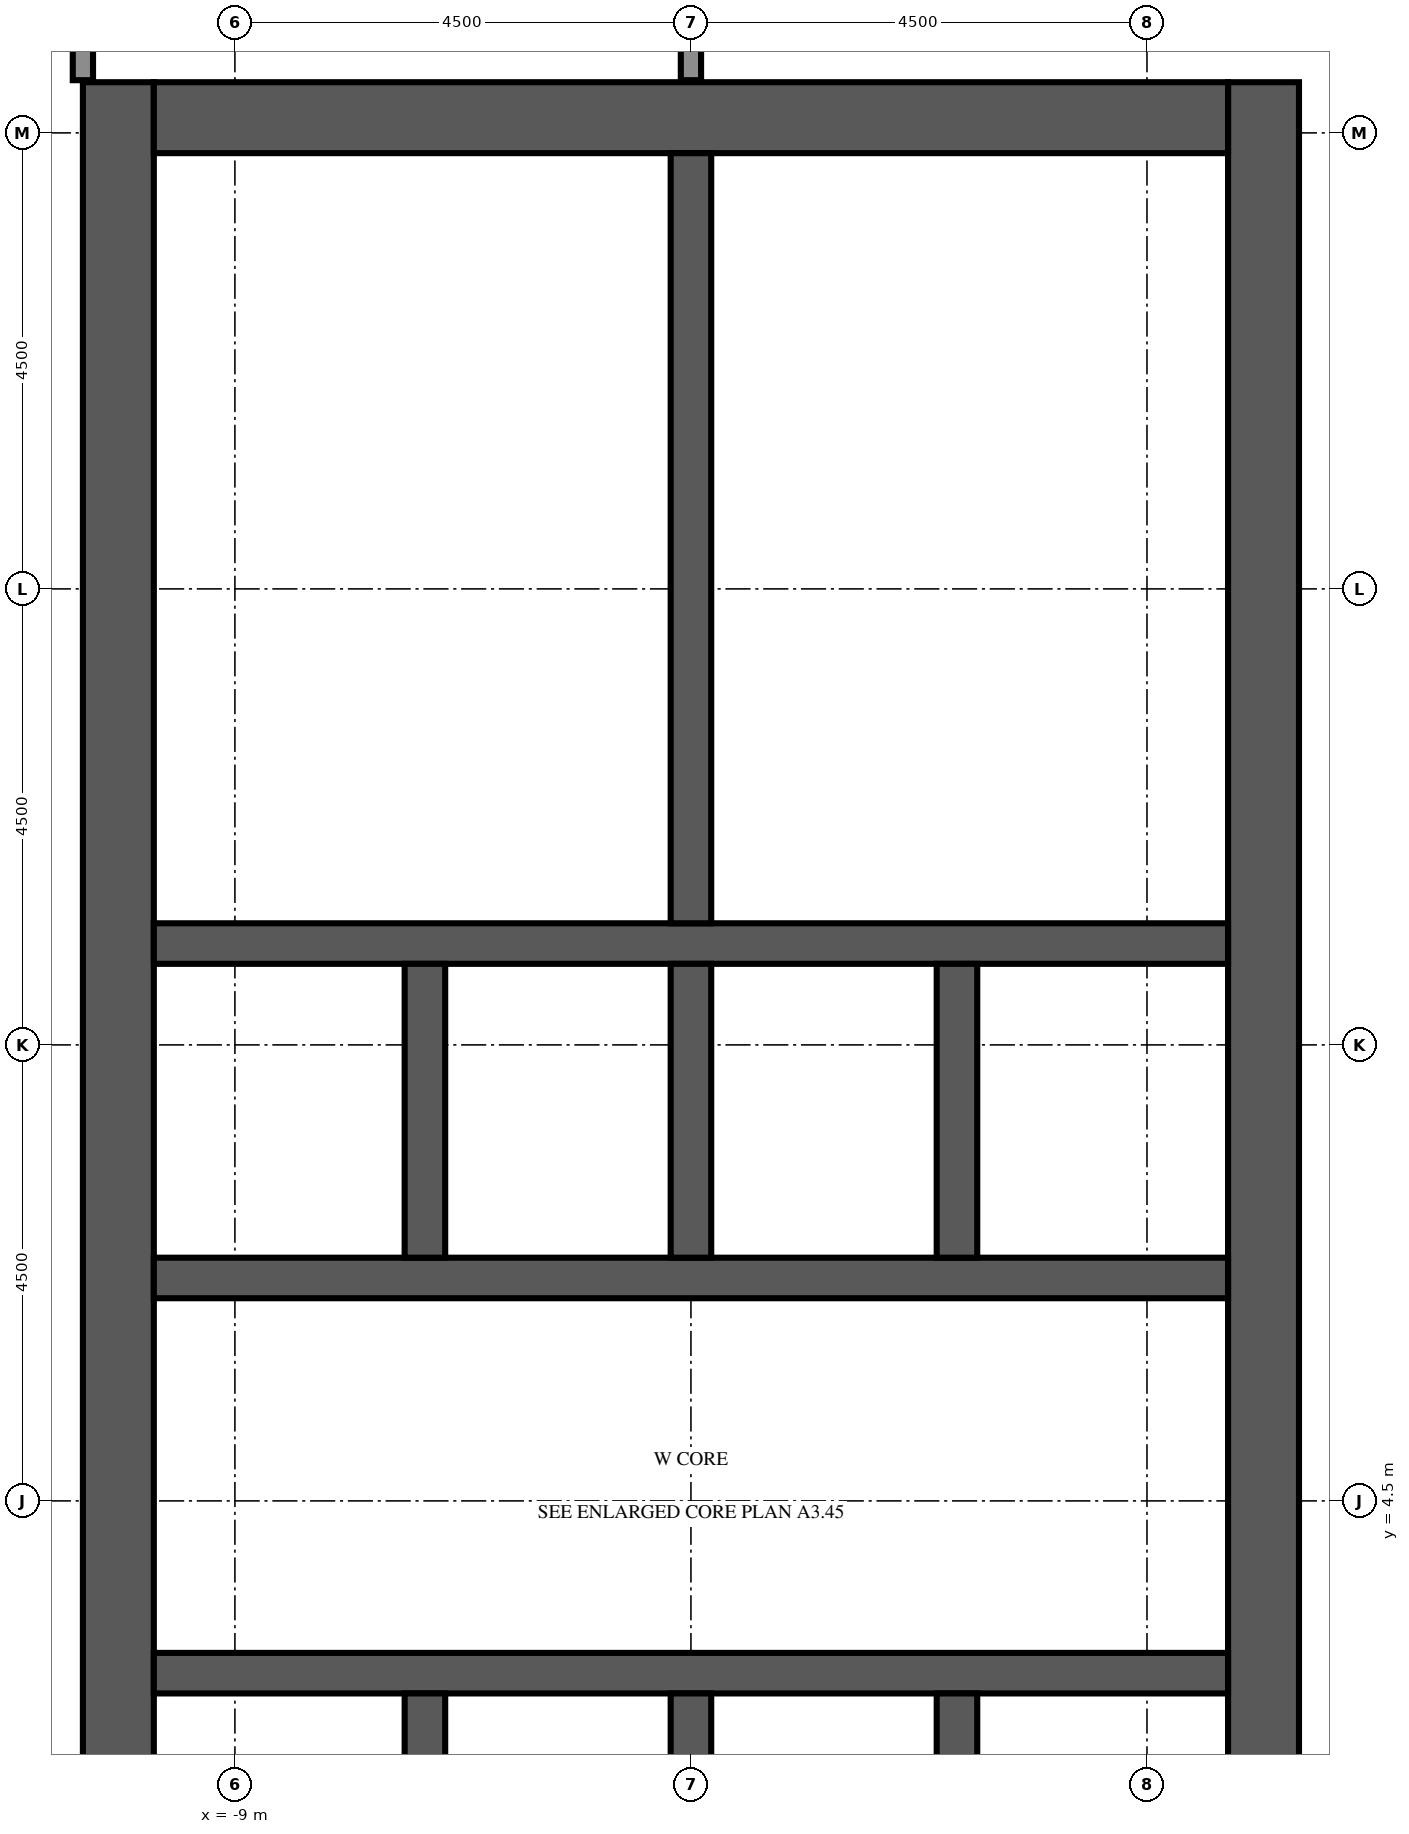
"""IFC4 building model, lengths in metres.
Left out: names, types, materials, properties, quantities, classifications, styles, units other than length and angle.
Written with IfcOpenShell. Run it as: python <this file> out.ifc"""

import sys

from ifc_helpers import new_model, si_unit, direction, frame, frame_2d, origin, place, context, subcontext, project, spatial, rectangle, extrude, element, fill, save


model = new_model("IFC4")
c1 = context("Model", 3, precision=1e-05, world=origin(), true_north=direction((0.0, 1.0)))
c2 = subcontext(c1, "Body", "Model", "MODEL_VIEW")
j1 = project(units=[si_unit("LENGTHUNIT", "METRE"), si_unit("PLANEANGLEUNIT", "RADIAN")], contexts=[c1])
p1 = place(None, origin())
s1 = spatial("IfcSite", under=j1, at=p1, CompositionType="ELEMENT")
p2 = place(p1, origin())
s2 = spatial("IfcBuilding", under=s1, at=p2, CompositionType="ELEMENT")
p3 = place(p2, frame((0.0, 0.0, 316.6)))
s3 = spatial("IfcBuildingStorey", under=s2, at=p3, CompositionType="ELEMENT", Elevation=316.6)
p4 = place(p3, frame((-10.15, -9.0, 0.0), z_axis=(0.0, 0.0, 1.0), x_axis=(0.0, 1.0, 0.0)))
e1 = element("IfcWall", 1, at=p4, inside=s3, PredefinedType="SHEAR", context=c2, shape_type="SweptSolid", body=[
    extrude(rectangle(XDim=27.5, YDim=0.7, at=frame_2d((13.75, 0.0))), origin(), (0.0, 0.0, 1.0), 4.8),
])
p5 = place(p4, frame((12.55, 0.0, 0.0)))
e2 = element("IfcOpeningElement", 2, at=p5, cuts=e1, PredefinedType="OPENING", context=c2, shape_type="SweptSolid", body=[
    extrude(rectangle(XDim=2.4, YDim=2.4, at=frame_2d((1.2, 1.2))), frame((0.0, 0.36, 0.0), z_axis=(0.0, -1.0, 0.0), x_axis=(1.0, 0.0, 0.0)), (0.0, 0.0, 1.0), 0.72),
])
p6 = place(p4, frame((6.825, 0.0, 0.0)))
e3 = element("IfcOpeningElement", 3, at=p6, cuts=e1, PredefinedType="OPENING", context=c2, shape_type="SweptSolid", body=[
    extrude(rectangle(XDim=1.2, YDim=2.1, at=frame_2d((0.6, 1.05))), frame((0.0, 0.36, 0.0), z_axis=(0.0, -1.0, 0.0), x_axis=(1.0, 0.0, 0.0)), (0.0, 0.0, 1.0), 0.72),
])
p7 = place(p4, frame((19.475, 0.0, 0.0)))
e4 = element("IfcOpeningElement", 4, at=p7, cuts=e1, PredefinedType="OPENING", context=c2, shape_type="SweptSolid", body=[
    extrude(rectangle(XDim=1.2, YDim=2.1, at=frame_2d((0.6, 1.05))), frame((0.0, 0.36, 0.0), z_axis=(0.0, -1.0, 0.0), x_axis=(1.0, 0.0, 0.0)), (0.0, 0.0, 1.0), 0.72),
])
p8 = place(p3, frame((1.15, -9.0, 0.0), z_axis=(0.0, 0.0, 1.0), x_axis=(0.0, 1.0, 0.0)))
e5 = element("IfcWall", 5, at=p8, inside=s3, PredefinedType="SHEAR", context=c2, shape_type="SweptSolid", body=[
    extrude(rectangle(XDim=27.5, YDim=0.7, at=frame_2d((13.75, 0.0))), origin(), (0.0, 0.0, 1.0), 4.8),
])
p9 = place(p8, frame((12.55, 0.0, 0.0)))
e6 = element("IfcOpeningElement", 6, at=p9, cuts=e5, PredefinedType="OPENING", context=c2, shape_type="SweptSolid", body=[
    extrude(rectangle(XDim=2.4, YDim=2.4, at=frame_2d((1.2, 1.2))), frame((0.0, 0.36, 0.0), z_axis=(0.0, -1.0, 0.0), x_axis=(1.0, 0.0, 0.0)), (0.0, 0.0, 1.0), 0.72),
])
p10 = place(p8, frame((5.42, 0.0, 0.0)))
e7 = element("IfcOpeningElement", 7, at=p10, cuts=e5, PredefinedType="OPENING", context=c2, shape_type="SweptSolid", body=[
    extrude(rectangle(XDim=1.2, YDim=2.1, at=frame_2d((0.6, 1.05))), frame((0.0, 0.36, 0.0), z_axis=(0.0, -1.0, 0.0), x_axis=(1.0, 0.0, 0.0)), (0.0, 0.0, 1.0), 0.72),
])
p11 = place(p8, frame((19.46, 0.0, 0.0)))
e8 = element("IfcOpeningElement", 8, at=p11, cuts=e5, PredefinedType="OPENING", context=c2, shape_type="SweptSolid", body=[
    extrude(rectangle(XDim=1.0, YDim=2.1, at=frame_2d((0.5, 1.05))), frame((0.0, 0.36, 0.0), z_axis=(0.0, -1.0, 0.0), x_axis=(1.0, 0.0, 0.0)), (0.0, 0.0, 1.0), 0.72),
])
p12 = place(p8, frame((21.17, 0.0, 0.0)))
e9 = element("IfcOpeningElement", 9, at=p12, cuts=e5, PredefinedType="OPENING", context=c2, shape_type="SweptSolid", body=[
    extrude(rectangle(XDim=1.0, YDim=2.1, at=frame_2d((0.5, 1.05))), frame((0.0, 0.36, 0.0), z_axis=(0.0, -1.0, 0.0), x_axis=(1.0, 0.0, 0.0)), (0.0, 0.0, 1.0), 0.72),
])
p13 = place(p8, frame((23.26, 0.0, 0.0)))
e10 = element("IfcOpeningElement", 10, at=p13, cuts=e5, PredefinedType="OPENING", context=c2, shape_type="SweptSolid", body=[
    extrude(rectangle(XDim=1.0, YDim=2.1, at=frame_2d((0.5, 1.05))), frame((0.0, 0.36, 0.0), z_axis=(0.0, -1.0, 0.0), x_axis=(1.0, 0.0, 0.0)), (0.0, 0.0, 1.0), 0.72),
])
p14 = place(p8, frame((25.35, 0.0, 0.0)))
e11 = element("IfcOpeningElement", 11, at=p14, cuts=e5, PredefinedType="OPENING", context=c2, shape_type="SweptSolid", body=[
    extrude(rectangle(XDim=1.0, YDim=2.1, at=frame_2d((0.5, 1.05))), frame((0.0, 0.36, 0.0), z_axis=(0.0, -1.0, 0.0), x_axis=(1.0, 0.0, 0.0)), (0.0, 0.0, 1.0), 0.72),
])
p15 = place(p3, frame((-9.8, 18.15, 0.0), z_axis=(0.0, 0.0, 1.0), x_axis=(1.0, 0.0, 0.0)))
e12 = element("IfcWall", 12, at=p15, inside=s3, PredefinedType="SHEAR", context=c2, shape_type="SweptSolid", body=[
    extrude(rectangle(XDim=10.6, YDim=0.7, at=frame_2d((5.3, 0.0))), origin(), (0.0, 0.0, 1.0), 4.8),
])
p16 = place(p3, frame((-9.8, 2.8, 0.0), z_axis=(0.0, 0.0, 1.0), x_axis=(1.0, 0.0, 0.0)))
e13 = element("IfcWall", 13, at=p16, inside=s3, PredefinedType="SHEAR", context=c2, shape_type="SweptSolid", body=[
    extrude(rectangle(XDim=10.6, YDim=0.4, at=frame_2d((5.3, 0.0))), origin(), (0.0, 0.0, 1.0), 4.8),
])
p17 = place(p16, frame((0.688, 0.0, 0.0)))
e14 = element("IfcOpeningElement", 14, at=p17, cuts=e13, PredefinedType="OPENING", context=c2, shape_type="SweptSolid", body=[
    extrude(rectangle(XDim=1.1, YDim=2.1, at=frame_2d((0.55, 1.05))), frame((0.0, 0.21, 0.0), z_axis=(0.0, -1.0, 0.0), x_axis=(1.0, 0.0, 0.0)), (0.0, 0.0, 1.0), 0.42),
])
p18 = place(p16, frame((3.438, 0.0, 0.0)))
e15 = element("IfcOpeningElement", 15, at=p18, cuts=e13, PredefinedType="OPENING", context=c2, shape_type="SweptSolid", body=[
    extrude(rectangle(XDim=1.1, YDim=2.1, at=frame_2d((0.55, 1.05))), frame((0.0, 0.21, 0.0), z_axis=(0.0, -1.0, 0.0), x_axis=(1.0, 0.0, 0.0)), (0.0, 0.0, 1.0), 0.42),
])
p19 = place(p16, frame((6.113, 0.0, 0.0)))
e16 = element("IfcOpeningElement", 16, at=p19, cuts=e13, PredefinedType="OPENING", context=c2, shape_type="SweptSolid", body=[
    extrude(rectangle(XDim=1.0, YDim=2.1, at=frame_2d((0.5, 1.05))), frame((0.0, 0.21, 0.0), z_axis=(0.0, -1.0, 0.0), x_axis=(1.0, 0.0, 0.0)), (0.0, 0.0, 1.0), 0.42),
])
p20 = place(p16, frame((8.863, 0.0, 0.0)))
e17 = element("IfcOpeningElement", 17, at=p20, cuts=e13, PredefinedType="OPENING", context=c2, shape_type="SweptSolid", body=[
    extrude(rectangle(XDim=1.0, YDim=2.1, at=frame_2d((0.5, 1.05))), frame((0.0, 0.21, 0.0), z_axis=(0.0, -1.0, 0.0), x_axis=(1.0, 0.0, 0.0)), (0.0, 0.0, 1.0), 0.42),
])
p21 = place(p3, frame((-9.8, 6.7, 0.0), z_axis=(0.0, 0.0, 1.0), x_axis=(1.0, 0.0, 0.0)))
e18 = element("IfcWall", 18, at=p21, inside=s3, PredefinedType="SHEAR", context=c2, shape_type="SweptSolid", body=[
    extrude(rectangle(XDim=10.6, YDim=0.4, at=frame_2d((5.3, 0.0))), origin(), (0.0, 0.0, 1.0), 4.8),
])
p22 = place(p21, frame((0.738, 0.0, 0.0)))
e19 = element("IfcOpeningElement", 19, at=p22, cuts=e18, PredefinedType="OPENING", context=c2, shape_type="SweptSolid", body=[
    extrude(rectangle(XDim=1.0, YDim=2.1, at=frame_2d((0.5, 1.05))), frame((0.0, 0.21, 0.0), z_axis=(0.0, -1.0, 0.0), x_axis=(1.0, 0.0, 0.0)), (0.0, 0.0, 1.0), 0.42),
])
p23 = place(p21, frame((3.488, 0.0, 0.0)))
e20 = element("IfcOpeningElement", 20, at=p23, cuts=e18, PredefinedType="OPENING", context=c2, shape_type="SweptSolid", body=[
    extrude(rectangle(XDim=1.0, YDim=2.1, at=frame_2d((0.5, 1.05))), frame((0.0, 0.21, 0.0), z_axis=(0.0, -1.0, 0.0), x_axis=(1.0, 0.0, 0.0)), (0.0, 0.0, 1.0), 0.42),
])
p24 = place(p21, frame((6.113, 0.0, 0.0)))
e21 = element("IfcOpeningElement", 21, at=p24, cuts=e18, PredefinedType="OPENING", context=c2, shape_type="SweptSolid", body=[
    extrude(rectangle(XDim=1.0, YDim=2.1, at=frame_2d((0.5, 1.05))), frame((0.0, 0.21, 0.0), z_axis=(0.0, -1.0, 0.0), x_axis=(1.0, 0.0, 0.0)), (0.0, 0.0, 1.0), 0.42),
])
p25 = place(p21, frame((8.863, 0.0, 0.0)))
e22 = element("IfcOpeningElement", 22, at=p25, cuts=e18, PredefinedType="OPENING", context=c2, shape_type="SweptSolid", body=[
    extrude(rectangle(XDim=1.0, YDim=2.1, at=frame_2d((0.5, 1.05))), frame((0.0, 0.21, 0.0), z_axis=(0.0, -1.0, 0.0), x_axis=(1.0, 0.0, 0.0)), (0.0, 0.0, 1.0), 0.42),
])
p26 = place(p3, frame((-9.8, 10.0, 0.0), z_axis=(0.0, 0.0, 1.0), x_axis=(1.0, 0.0, 0.0)))
e23 = element("IfcWall", 23, at=p26, inside=s3, PredefinedType="SHEAR", context=c2, shape_type="SweptSolid", body=[
    extrude(rectangle(XDim=10.6, YDim=0.4, at=frame_2d((5.3, 0.0))), origin(), (0.0, 0.0, 1.0), 4.8),
])
for number, where, z_axis, x_axis in (
    (24, (-7.125, -0.3, 0.0), (0.0, 0.0, 1.0), (0.0, 1.0, 0.0)),
    (25, (-7.125, 6.9, 0.0), (0.0, 0.0, 1.0), (0.0, 1.0, 0.0)),
    (26, (-4.5, -0.3, 0.0), (0.0, 0.0, 1.0), (0.0, 1.0, 0.0)),
    (27, (-4.5, 6.9, 0.0), (0.0, 0.0, 1.0), (0.0, 1.0, 0.0)),
    (28, (-1.875, -0.3, 0.0), (0.0, 0.0, 1.0), (0.0, 1.0, 0.0)),
    (29, (-1.875, 6.9, 0.0), (0.0, 0.0, 1.0), (0.0, 1.0, 0.0)),
):
    element("IfcWall", number, at=place(p3, frame(where, z_axis=z_axis, x_axis=x_axis)), inside=s3, PredefinedType="SHEAR", context=c2, shape_type="SweptSolid", body=[
        extrude(rectangle(XDim=2.9, YDim=0.4, at=frame_2d((1.45, 0.0))), origin(), (0.0, 0.0, 1.0), 4.8),
    ])
p27 = place(p3, frame((-4.5, 10.2, 0.0), z_axis=(0.0, 0.0, 1.0), x_axis=(0.0, 1.0, 0.0)))
e30 = element("IfcWall", 30, at=p27, inside=s3, PredefinedType="SHEAR", context=c2, shape_type="SweptSolid", body=[
    extrude(rectangle(XDim=7.6, YDim=0.4, at=frame_2d((3.8, 0.0))), origin(), (0.0, 0.0, 1.0), 4.8),
])
p28 = place(p3, frame((-10.5, 18.52, 0.0), z_axis=(0.0, 0.0, 1.0), x_axis=(0.0, 1.0, 0.0)))
e31 = element("IfcWall", 31, at=p28, inside=s3, PredefinedType="PARTITIONING", context=c2, shape_type="SweptSolid", body=[
    extrude(rectangle(XDim=2.275, YDim=0.2, at=frame_2d((1.137, 0.0))), origin(), (0.0, 0.0, 1.0), 4.2),
])
p29 = place(p3, frame((-4.5, 22.355, 0.0), z_axis=(0.0, 0.0, 1.0), x_axis=(0.0, -1.0, 0.0)))
e32 = element("IfcWall", 32, at=p29, inside=s3, PredefinedType="PARTITIONING", context=c2, shape_type="SweptSolid", body=[
    extrude(rectangle(XDim=3.835, YDim=0.2, at=frame_2d((1.917, 0.0))), origin(), (0.0, 0.0, 1.0), 4.2),
])
p30 = place(p29, frame((1.255, 0.0, 0.0)))
e33 = element("IfcOpeningElement", 33, at=p30, cuts=e32, PredefinedType="OPENING", context=c2, shape_type="SweptSolid", body=[
    extrude(rectangle(XDim=1.0, YDim=2.1, at=frame_2d((0.5, 1.05))), frame((0.0, 0.11, 0.0), z_axis=(0.0, -1.0, 0.0), x_axis=(1.0, 0.0, 0.0)), (0.0, 0.0, 1.0), 0.22),
])
for number, where, z_axis, x_axis in (
    (34, (-4.3, 11.72, 0.0), (0.0, 0.0, 1.0), (1.0, 0.0, 0.0)),
    (35, (-4.3, 13.62, 0.0), (0.0, 0.0, 1.0), (1.0, 0.0, 0.0)),
    (36, (-4.3, 15.9, 0.0), (0.0, 0.0, 1.0), (1.0, 0.0, 0.0)),
):
    element("IfcWall", number, at=place(p3, frame(where, z_axis=z_axis, x_axis=x_axis)), inside=s3, PredefinedType="PARTITIONING", context=c2, shape_type="SweptSolid", body=[
        extrude(rectangle(XDim=5.1, YDim=0.1, at=frame_2d((2.55, 0.0))), origin(), (0.0, 0.0, 1.0), 4.2),
    ])
p31 = place(p17, origin())
e37 = element("IfcDoor", 37, at=p31, inside=s3, OperationType="DOUBLE_DOOR_SLIDING", PredefinedType="DOOR", context=c2, shape_type="SweptSolid", body=[
    extrude(rectangle(XDim=1.1, YDim=2.1, at=frame_2d((0.55, 1.05))), frame((0.0, 0.025, 0.0), z_axis=(0.0, -1.0, 0.0), x_axis=(1.0, 0.0, 0.0)), (0.0, 0.0, 1.0), 0.05),
])
fill(e14, e37)
p32 = place(p18, origin())
e38 = element("IfcDoor", 38, at=p32, inside=s3, OperationType="DOUBLE_DOOR_SLIDING", PredefinedType="DOOR", context=c2, shape_type="SweptSolid", body=[
    extrude(rectangle(XDim=1.1, YDim=2.1, at=frame_2d((0.55, 1.05))), frame((0.0, 0.025, 0.0), z_axis=(0.0, -1.0, 0.0), x_axis=(1.0, 0.0, 0.0)), (0.0, 0.0, 1.0), 0.05),
])
fill(e15, e38)
p33 = place(p5, origin())
e39 = element("IfcDoor", 39, at=p33, inside=s3, OperationType="DOUBLE_DOOR_DOUBLE_SWING", PredefinedType="DOOR", context=c2, shape_type="SweptSolid", body=[
    extrude(rectangle(XDim=2.4, YDim=2.4, at=frame_2d((1.2, 1.2))), frame((0.0, 0.025, 0.0), z_axis=(0.0, -1.0, 0.0), x_axis=(1.0, 0.0, 0.0)), (0.0, 0.0, 1.0), 0.05),
])
fill(e2, e39)
p34 = place(p9, origin())
e40 = element("IfcDoor", 40, at=p34, inside=s3, OperationType="DOUBLE_DOOR_DOUBLE_SWING", PredefinedType="DOOR", context=c2, shape_type="SweptSolid", body=[
    extrude(rectangle(XDim=2.4, YDim=2.4, at=frame_2d((1.2, 1.2))), frame((0.0, 0.025, 0.0), z_axis=(0.0, -1.0, 0.0), x_axis=(1.0, 0.0, 0.0)), (0.0, 0.0, 1.0), 0.05),
])
fill(e6, e40)
p35 = place(p7, origin())
e41 = element("IfcDoor", 41, at=p35, inside=s3, OperationType="SINGLE_SWING_LEFT", PredefinedType="DOOR", context=c2, shape_type="SweptSolid", body=[
    extrude(rectangle(XDim=1.2, YDim=2.1, at=frame_2d((0.6, 1.05))), frame((0.0, 0.025, 0.0), z_axis=(0.0, -1.0, 0.0), x_axis=(1.0, 0.0, 0.0)), (0.0, 0.0, 1.0), 0.05),
])
fill(e4, e41)
p36 = place(p19, origin())
e42 = element("IfcDoor", 42, at=p36, inside=s3, OperationType="SINGLE_SWING_LEFT", PredefinedType="DOOR", context=c2, shape_type="SweptSolid", body=[
    extrude(rectangle(XDim=1.0, YDim=2.1, at=frame_2d((0.5, 1.05))), frame((0.0, 0.025, 0.0), z_axis=(0.0, -1.0, 0.0), x_axis=(1.0, 0.0, 0.0)), (0.0, 0.0, 1.0), 0.05),
])
fill(e16, e42)
p37 = place(p20, origin())
e43 = element("IfcDoor", 43, at=p37, inside=s3, OperationType="SINGLE_SWING_RIGHT", PredefinedType="DOOR", context=c2, shape_type="SweptSolid", body=[
    extrude(rectangle(XDim=1.0, YDim=2.1, at=frame_2d((0.5, 1.05))), frame((0.0, 0.025, 0.0), z_axis=(0.0, -1.0, 0.0), x_axis=(1.0, 0.0, 0.0)), (0.0, 0.0, 1.0), 0.05),
])
fill(e17, e43)
p38 = place(p22, origin())
e44 = element("IfcDoor", 44, at=p38, inside=s3, OperationType="SINGLE_SWING_LEFT", PredefinedType="DOOR", context=c2, shape_type="SweptSolid", body=[
    extrude(rectangle(XDim=1.0, YDim=2.1, at=frame_2d((0.5, 1.05))), frame((0.0, 0.025, 0.0), z_axis=(0.0, -1.0, 0.0), x_axis=(1.0, 0.0, 0.0)), (0.0, 0.0, 1.0), 0.05),
])
fill(e19, e44)
p39 = place(p23, origin())
e45 = element("IfcDoor", 45, at=p39, inside=s3, OperationType="SINGLE_SWING_RIGHT", PredefinedType="DOOR", context=c2, shape_type="SweptSolid", body=[
    extrude(rectangle(XDim=1.0, YDim=2.1, at=frame_2d((0.5, 1.05))), frame((0.0, 0.025, 0.0), z_axis=(0.0, -1.0, 0.0), x_axis=(1.0, 0.0, 0.0)), (0.0, 0.0, 1.0), 0.05),
])
fill(e20, e45)
p40 = place(p24, origin())
e46 = element("IfcDoor", 46, at=p40, inside=s3, OperationType="SINGLE_SWING_LEFT", PredefinedType="DOOR", context=c2, shape_type="SweptSolid", body=[
    extrude(rectangle(XDim=1.0, YDim=2.1, at=frame_2d((0.5, 1.05))), frame((0.0, 0.025, 0.0), z_axis=(0.0, -1.0, 0.0), x_axis=(1.0, 0.0, 0.0)), (0.0, 0.0, 1.0), 0.05),
])
fill(e21, e46)
p41 = place(p25, origin())
e47 = element("IfcDoor", 47, at=p41, inside=s3, OperationType="SINGLE_SWING_RIGHT", PredefinedType="DOOR", context=c2, shape_type="SweptSolid", body=[
    extrude(rectangle(XDim=1.0, YDim=2.1, at=frame_2d((0.5, 1.05))), frame((0.0, 0.025, 0.0), z_axis=(0.0, -1.0, 0.0), x_axis=(1.0, 0.0, 0.0)), (0.0, 0.0, 1.0), 0.05),
])
fill(e22, e47)
p42 = place(p11, origin())
e48 = element("IfcDoor", 48, at=p42, inside=s3, OperationType="SINGLE_SWING_LEFT", PredefinedType="DOOR", context=c2, shape_type="SweptSolid", body=[
    extrude(rectangle(XDim=1.0, YDim=2.1, at=frame_2d((0.5, 1.05))), frame((0.0, 0.325, 0.0), z_axis=(0.0, -1.0, 0.0), x_axis=(1.0, 0.0, 0.0)), (0.0, 0.0, 1.0), 0.05),
])
fill(e8, e48)
p43 = place(p12, origin())
e49 = element("IfcDoor", 49, at=p43, inside=s3, OperationType="SINGLE_SWING_RIGHT", PredefinedType="DOOR", context=c2, shape_type="SweptSolid", body=[
    extrude(rectangle(XDim=1.0, YDim=2.1, at=frame_2d((0.5, 1.05))), frame((0.0, 0.325, 0.0), z_axis=(0.0, -1.0, 0.0), x_axis=(1.0, 0.0, 0.0)), (0.0, 0.0, 1.0), 0.05),
])
fill(e9, e49)
p44 = place(p13, origin())
e50 = element("IfcDoor", 50, at=p44, inside=s3, OperationType="SINGLE_SWING_LEFT", PredefinedType="DOOR", context=c2, shape_type="SweptSolid", body=[
    extrude(rectangle(XDim=1.0, YDim=2.1, at=frame_2d((0.5, 1.05))), frame((0.0, 0.325, 0.0), z_axis=(0.0, -1.0, 0.0), x_axis=(1.0, 0.0, 0.0)), (0.0, 0.0, 1.0), 0.05),
])
fill(e10, e50)
p45 = place(p14, origin())
e51 = element("IfcDoor", 51, at=p45, inside=s3, OperationType="SINGLE_SWING_RIGHT", PredefinedType="DOOR", context=c2, shape_type="SweptSolid", body=[
    extrude(rectangle(XDim=1.0, YDim=2.1, at=frame_2d((0.5, 1.05))), frame((0.0, 0.325, 0.0), z_axis=(0.0, -1.0, 0.0), x_axis=(1.0, 0.0, 0.0)), (0.0, 0.0, 1.0), 0.05),
])
fill(e11, e51)
save(model, sys.argv[1])
